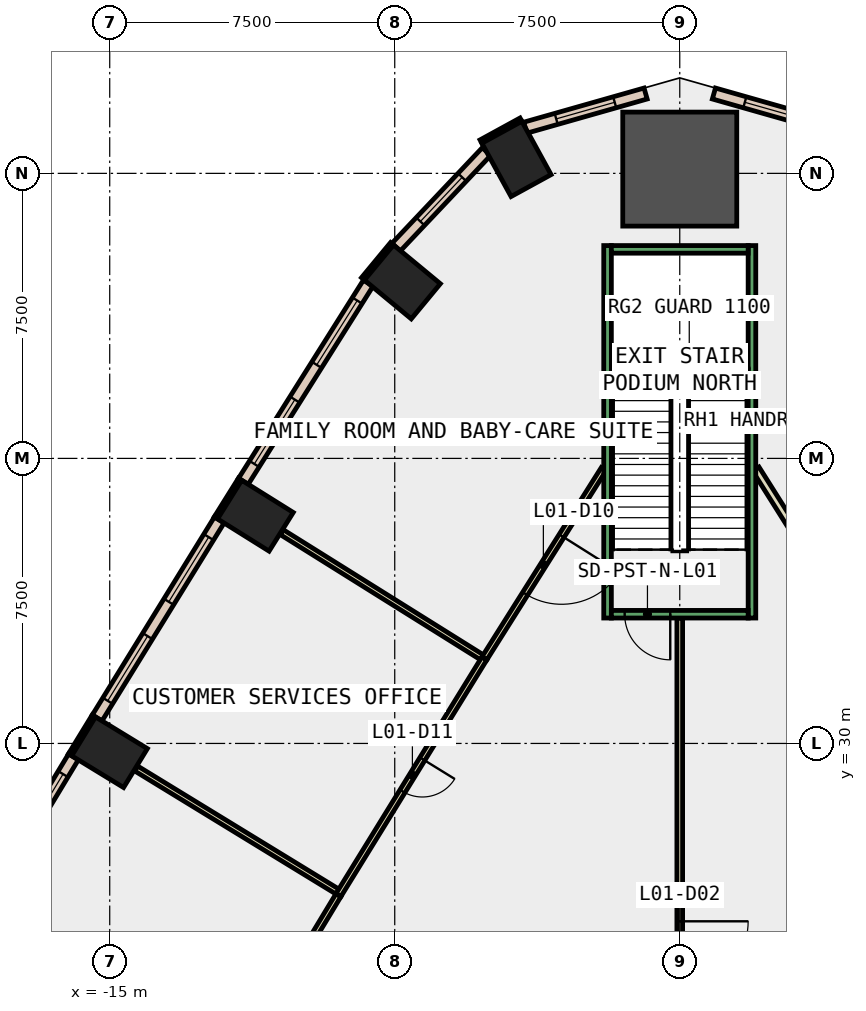
"""IFC4 building model, lengths in metres.
Left out: names, types, materials, properties, quantities, classifications, styles, units other than length and angle.
Written with IfcOpenShell. Run it as: python <this file> out.ifc"""

import sys

from ifc_helpers import new_model, si_unit, direction, frame, frame_2d, origin, origin_2d, place, context, subcontext, project, spatial, rectangle, extrude, element, fill, save


model = new_model("IFC4")
c1 = context("Model", 3, precision=1e-05, world=origin(), true_north=direction((0.0, 1.0)))
c2 = subcontext(c1, "Body", "Model", "MODEL_VIEW")
j1 = project(units=[si_unit("LENGTHUNIT", "METRE"), si_unit("PLANEANGLEUNIT", "RADIAN")], contexts=[c1])
p1 = place(None, origin())
s1 = spatial("IfcSite", under=j1, at=p1, CompositionType="ELEMENT")
p2 = place(p1, origin())
s2 = spatial("IfcBuilding", under=s1, at=p2, CompositionType="ELEMENT")
p3 = place(p2, frame((0.0, 0.0, 9.0)))
s3 = spatial("IfcBuildingStorey", under=s2, at=p3, CompositionType="ELEMENT", Elevation=9.0)
p4 = place(p3, frame((0.0, 45.112, -0.45), z_axis=(0.0, 0.0, 1.0), x_axis=(0.0, 1.0, 0.0)))
e1 = element("IfcColumn", 1, at=p4, inside=s3, PredefinedType="COLUMN", context=c2, shape_type="SweptSolid", body=[
    extrude(rectangle(XDim=3.0, YDim=3.0, at=origin_2d()), origin(), (0.0, 0.0, 1.0), 6.0),
])
for number, where, z_axis, x_axis in (
    (2, (-4.297, 45.38, -0.45), (0.0, 0.0, 1.0), (0.877, 0.48, 0.0)),
    (3, (-7.299, 42.144, -0.45), (0.0, 0.0, 1.0), (0.638, 0.77, 0.0)),
    (4, (-11.167, 35.993, -0.45), (0.0, 0.0, 1.0), (0.53, 0.848, 0.0)),
    (5, (-15.005, 29.769, -0.45), (0.0, 0.0, 1.0), (0.522, 0.853, 0.0)),
):
    element("IfcColumn", number, at=place(p3, frame(where, z_axis=z_axis, x_axis=x_axis)), inside=s3, PredefinedType="COLUMN", context=c2, shape_type="SweptSolid", body=[
        extrude(rectangle(XDim=1.2, YDim=1.6, at=origin_2d()), origin(), (0.0, 0.0, 1.0), 6.0),
    ])
for number, where, z_axis, x_axis in (
    (6, (-4.179, 46.413, 0.0), (0.0, 0.0, 1.0), (-0.877, -0.48, 0.0)),
    (7, (-7.571, 43.148, 0.0), (0.0, 0.0, 1.0), (-0.638, -0.77, 0.0)),
    (8, (-11.57, 36.952, 0.0), (0.0, 0.0, 1.0), (-0.53, -0.848, 0.0)),
):
    element("IfcWall", number, at=place(p3, frame(where, z_axis=z_axis, x_axis=x_axis)), inside=s3, PredefinedType="STANDARD", context=c2, shape_type="SweptSolid", body=[
        extrude(rectangle(XDim=1.199, YDim=0.1, at=frame_2d((0.6, 0.0))), origin(), (0.0, 0.0, 1.0), 5.55),
    ])
p5 = place(p3, frame((-15.417, 30.724, 0.0), z_axis=(0.0, 0.0, 1.0), x_axis=(-0.521507599072, -0.853246637327, 0.0)))
e9 = element("IfcWall", 9, at=p5, inside=s3, PredefinedType="STANDARD", context=c2, shape_type="SweptSolid", body=[
    extrude(rectangle(XDim=1.2, YDim=0.1, at=frame_2d((0.6, 0.0))), origin(), (0.0, 0.0, 1.0), 5.55),
])
p6 = place(p3, frame((4.064, 46.202, 0.0), z_axis=(0.0, 0.0, 1.0), x_axis=(-0.961934470867, 0.273280211062, 0.0)))
e10 = element("IfcWall", 10, at=p6, inside=s3, PredefinedType="STANDARD", context=c2, shape_type="SweptSolid", body=[
    extrude(rectangle(XDim=3.29, YDim=0.3, at=frame_2d((1.645, 0.0))), origin(), (0.0, 0.0, 1.0), 5.55),
])
p7 = place(p6, frame((0.845, 0.0, 1.0)))
e11 = element("IfcOpeningElement", 11, at=p7, cuts=e10, PredefinedType="OPENING", context=c2, shape_type="SweptSolid", body=[
    extrude(rectangle(XDim=1.6, YDim=4.0, at=frame_2d((0.8, 2.0))), frame((0.0, 0.16, 0.0), z_axis=(0.0, -1.0, 0.0), x_axis=(1.0, 0.0, 0.0)), (0.0, 0.0, 1.0), 0.32),
])
p8 = place(p3, frame((-0.899, 47.101, 0.0), z_axis=(0.0, 0.0, 1.0), x_axis=(-0.961934470867, -0.273280211062, 0.0)))
e12 = element("IfcWall", 12, at=p8, inside=s3, PredefinedType="STANDARD", context=c2, shape_type="SweptSolid", body=[
    extrude(rectangle(XDim=3.29, YDim=0.3, at=frame_2d((1.645, 0.0))), origin(), (0.0, 0.0, 1.0), 5.55),
])
p9 = place(p8, frame((0.845, 0.0, 1.0)))
e13 = element("IfcOpeningElement", 13, at=p9, cuts=e12, PredefinedType="OPENING", context=c2, shape_type="SweptSolid", body=[
    extrude(rectangle(XDim=1.6, YDim=4.0, at=frame_2d((0.8, 2.0))), frame((0.0, 0.16, 0.0), z_axis=(0.0, -1.0, 0.0), x_axis=(1.0, 0.0, 0.0)), (0.0, 0.0, 1.0), 0.32),
])
p10 = place(p3, frame((-5.086, 45.573, 0.0), z_axis=(0.0, 0.0, 1.0), x_axis=(-0.687081126245, -0.726580708495, 0.0)))
e14 = element("IfcWall", 14, at=p10, inside=s3, PredefinedType="STANDARD", context=c2, shape_type="SweptSolid", body=[
    extrude(rectangle(XDim=3.461, YDim=0.3, at=frame_2d((1.73, 0.0))), origin(), (0.0, 0.0, 1.0), 5.55),
])
p11 = place(p10, frame((0.931, 0.0, 1.0)))
e15 = element("IfcOpeningElement", 15, at=p11, cuts=e14, PredefinedType="OPENING", context=c2, shape_type="SweptSolid", body=[
    extrude(rectangle(XDim=1.6, YDim=4.0, at=frame_2d((0.8, 2.0))), frame((0.0, 0.16, 0.0), z_axis=(0.0, -1.0, 0.0), x_axis=(1.0, 0.0, 0.0)), (0.0, 0.0, 1.0), 0.32),
])
p12 = place(p3, frame((-8.198, 42.111, 0.0), z_axis=(0.0, 0.0, 1.0), x_axis=(-0.53304020879, -0.846089910006, 0.0)))
e16 = element("IfcWall", 16, at=p12, inside=s3, PredefinedType="STANDARD", context=c2, shape_type="SweptSolid", body=[
    extrude(rectangle(XDim=6.163, YDim=0.3, at=frame_2d((3.081, 0.0))), origin(), (0.0, 0.0, 1.0), 5.55),
])
p13 = place(p12, frame((0.541, 0.0, 1.0)))
e17 = element("IfcOpeningElement", 17, at=p13, cuts=e16, PredefinedType="OPENING", context=c2, shape_type="SweptSolid", body=[
    extrude(rectangle(XDim=2.0, YDim=4.0, at=frame_2d((1.0, 2.0))), frame((0.0, 0.16, 0.0), z_axis=(0.0, -1.0, 0.0), x_axis=(1.0, 0.0, 0.0)), (0.0, 0.0, 1.0), 0.32),
])
p14 = place(p12, frame((3.622, 0.0, 1.0)))
e18 = element("IfcOpeningElement", 18, at=p14, cuts=e16, PredefinedType="OPENING", context=c2, shape_type="SweptSolid", body=[
    extrude(rectangle(XDim=2.0, YDim=4.0, at=frame_2d((1.0, 2.0))), frame((0.0, 0.16, 0.0), z_axis=(0.0, -1.0, 0.0), x_axis=(1.0, 0.0, 0.0)), (0.0, 0.0, 1.0), 0.32),
])
p15 = place(p3, frame((-12.117, 35.881, 0.0), z_axis=(0.0, 0.0, 1.0), x_axis=(-0.524953701886, -0.85113078365, 0.0)))
e19 = element("IfcWall", 19, at=p15, inside=s3, PredefinedType="STANDARD", context=c2, shape_type="SweptSolid", body=[
    extrude(rectangle(XDim=6.123, YDim=0.3, at=frame_2d((3.061, 0.0))), origin(), (0.0, 0.0, 1.0), 5.55),
])
p16 = place(p15, frame((0.531, 0.0, 1.0)))
e20 = element("IfcOpeningElement", 20, at=p16, cuts=e19, PredefinedType="OPENING", context=c2, shape_type="SweptSolid", body=[
    extrude(rectangle(XDim=2.0, YDim=4.0, at=frame_2d((1.0, 2.0))), frame((0.0, 0.16, 0.0), z_axis=(0.0, -1.0, 0.0), x_axis=(1.0, 0.0, 0.0)), (0.0, 0.0, 1.0), 0.32),
])
p17 = place(p15, frame((3.592, 0.0, 1.0)))
e21 = element("IfcOpeningElement", 21, at=p17, cuts=e19, PredefinedType="OPENING", context=c2, shape_type="SweptSolid", body=[
    extrude(rectangle(XDim=2.0, YDim=4.0, at=frame_2d((1.0, 2.0))), frame((0.0, 0.16, 0.0), z_axis=(0.0, -1.0, 0.0), x_axis=(1.0, 0.0, 0.0)), (0.0, 0.0, 1.0), 0.32),
])
p18 = place(p3, frame((-15.954, 29.647, 0.0), z_axis=(0.0, 0.0, 1.0), x_axis=(-0.516687651362, -0.85617397235, 0.0)))
e22 = element("IfcWall", 22, at=p18, inside=s3, PredefinedType="STANDARD", context=c2, shape_type="SweptSolid", body=[
    extrude(rectangle(XDim=6.121, YDim=0.3, at=frame_2d((3.061, 0.0))), origin(), (0.0, 0.0, 1.0), 5.55),
])
p19 = place(p18, frame((0.53, 0.0, 1.0)))
e23 = element("IfcOpeningElement", 23, at=p19, cuts=e22, PredefinedType="OPENING", context=c2, shape_type="SweptSolid", body=[
    extrude(rectangle(XDim=2.0, YDim=4.0, at=frame_2d((1.0, 2.0))), frame((0.0, 0.16, 0.0), z_axis=(0.0, -1.0, 0.0), x_axis=(1.0, 0.0, 0.0)), (0.0, 0.0, 1.0), 0.32),
])
p20 = place(p18, frame((3.591, 0.0, 1.0)))
e24 = element("IfcOpeningElement", 24, at=p20, cuts=e22, PredefinedType="OPENING", context=c2, shape_type="SweptSolid", body=[
    extrude(rectangle(XDim=2.0, YDim=4.0, at=frame_2d((1.0, 2.0))), frame((0.0, 0.16, 0.0), z_axis=(0.0, -1.0, 0.0), x_axis=(1.0, 0.0, 0.0)), (0.0, 0.0, 1.0), 0.32),
])
p21 = place(p3, frame((5.141, 32.238, 0.0), z_axis=(0.0, 0.0, 1.0), x_axis=(-0.533266105174, 0.8459475522, 0.0)))
e25 = element("IfcWall", 25, at=p21, inside=s3, PredefinedType="PARTITIONING", context=c2, shape_type="SweptSolid", body=[
    extrude(rectangle(XDim=5.89, YDim=0.2, at=frame_2d((2.945, 0.0))), origin(), (0.0, 0.0, 1.0), 5.55),
])
p22 = place(p3, frame((-5.146, 32.229, 0.0), z_axis=(0.0, 0.0, 1.0), x_axis=(-0.847900028258, 0.530156148771, 0.0)))
e26 = element("IfcWall", 26, at=p22, inside=s3, PredefinedType="PARTITIONING", context=c2, shape_type="SweptSolid", body=[
    extrude(rectangle(XDim=6.281, YDim=0.15, at=frame_2d((3.141, 0.0))), origin(), (0.0, 0.0, 1.0), 5.55),
])
p23 = place(p3, frame((-2.0, 37.221, 0.0), z_axis=(0.0, 0.0, 1.0), x_axis=(-0.533266105174, -0.8459475522, 0.0)))
e27 = element("IfcWall", 27, at=p23, inside=s3, PredefinedType="PARTITIONING", context=c2, shape_type="SweptSolid", body=[
    extrude(rectangle(XDim=5.89, YDim=0.15, at=frame_2d((2.945, 0.0))), origin(), (0.0, 0.0, 1.0), 5.55),
])
p24 = place(p23, frame((2.08, 0.0, 0.0)))
e28 = element("IfcOpeningElement", 28, at=p24, cuts=e27, PredefinedType="OPENING", context=c2, shape_type="SweptSolid", body=[
    extrude(rectangle(XDim=1.8, YDim=2.1, at=frame_2d((0.9, 1.05))), frame((0.0, 0.085, 0.0), z_axis=(0.0, -1.0, 0.0), x_axis=(1.0, 0.0, 0.0)), (0.0, 0.0, 1.0), 0.17),
])
p25 = place(p3, frame((-8.947, 26.065, 0.0), z_axis=(0.0, 0.0, 1.0), x_axis=(-0.853151116909, 0.521663849348, 0.0)))
e29 = element("IfcWall", 29, at=p25, inside=s3, PredefinedType="PARTITIONING", context=c2, shape_type="SweptSolid", body=[
    extrude(rectangle(XDim=6.28, YDim=0.15, at=frame_2d((3.14, 0.0))), origin(), (0.0, 0.0, 1.0), 5.55),
])
p26 = place(p3, frame((-5.141, 32.238, 0.0), z_axis=(0.0, 0.0, 1.0), x_axis=(-0.52478961199, -0.851231967884, 0.0)))
e30 = element("IfcWall", 30, at=p26, inside=s3, PredefinedType="PARTITIONING", context=c2, shape_type="SweptSolid", body=[
    extrude(rectangle(XDim=7.319, YDim=0.15, at=frame_2d((3.659, 0.0))), origin(), (0.0, 0.0, 1.0), 5.55),
])
p27 = place(p26, frame((3.11, 0.0, 0.0)))
e31 = element("IfcOpeningElement", 31, at=p27, cuts=e30, PredefinedType="OPENING", context=c2, shape_type="SweptSolid", body=[
    extrude(rectangle(XDim=1.0, YDim=2.1, at=frame_2d((0.5, 1.05))), frame((0.0, 0.085, 0.0), z_axis=(0.0, -1.0, 0.0), x_axis=(1.0, 0.0, 0.0)), (0.0, 0.0, 1.0), 0.17),
])
p28 = place(p3, frame((-8.981, 26.008, 0.0), z_axis=(0.0, 0.0, 1.0), x_axis=(-0.516682614934, -0.856177011736, 0.0)))
e32 = element("IfcWall", 32, at=p28, inside=s3, PredefinedType="PARTITIONING", context=c2, shape_type="SweptSolid", body=[
    extrude(rectangle(XDim=7.169, YDim=0.15, at=frame_2d((3.584, 0.0))), origin(), (0.0, 0.0, 1.0), 5.55),
])
p29 = place(p3, frame((0.0, 33.3, 0.0), z_axis=(0.0, 0.0, 1.0), x_axis=(0.0, -1.0, 0.0)))
e33 = element("IfcWall", 33, at=p29, inside=s3, PredefinedType="PARTITIONING", context=c2, shape_type="SweptSolid", body=[
    extrude(rectangle(XDim=9.8, YDim=0.15, at=frame_2d((4.9, 0.0))), origin(), (0.0, 0.0, 1.0), 5.55),
])
p30 = place(p29, frame((7.98, 0.0, 0.0)))
e34 = element("IfcOpeningElement", 34, at=p30, cuts=e33, PredefinedType="OPENING", context=c2, shape_type="SweptSolid", body=[
    extrude(rectangle(XDim=1.8, YDim=2.1, at=frame_2d((0.9, 1.05))), frame((0.0, 0.085, 0.0), z_axis=(0.0, -1.0, 0.0), x_axis=(1.0, 0.0, 0.0)), (0.0, 0.0, 1.0), 0.17),
])
for number, where, z_axis, x_axis in (
    (35, (1.9, 33.3, 0.0), (0.0, 0.0, 1.0), (0.0, 1.0, 0.0)),
    (36, (-1.9, 33.3, 0.0), (0.0, 0.0, 1.0), (0.0, 1.0, 0.0)),
):
    element("IfcWall", number, at=place(p3, frame(where, z_axis=z_axis, x_axis=x_axis)), inside=s3, PredefinedType="STANDARD", context=c2, shape_type="SweptSolid", body=[
        extrude(rectangle(XDim=9.8, YDim=0.2, at=frame_2d((4.9, 0.0))), origin(), (0.0, 0.0, 1.0), 5.55),
    ])
p31 = place(p3, frame((1.8, 33.4, 0.0), z_axis=(0.0, 0.0, 1.0), x_axis=(-1.0, 0.0, 0.0)))
e37 = element("IfcWall", 37, at=p31, inside=s3, PredefinedType="STANDARD", context=c2, shape_type="SweptSolid", body=[
    extrude(rectangle(XDim=3.6, YDim=0.2, at=frame_2d((1.8, 0.0))), origin(), (0.0, 0.0, 1.0), 5.55),
])
p32 = place(p31, frame((2.05, 0.0, 0.0)))
e38 = element("IfcOpeningElement", 38, at=p32, cuts=e37, PredefinedType="OPENING", context=c2, shape_type="SweptSolid", body=[
    extrude(rectangle(XDim=1.2, YDim=2.2, at=frame_2d((0.6, 1.1))), frame((0.0, 0.11, 0.0), z_axis=(0.0, -1.0, 0.0), x_axis=(1.0, 0.0, 0.0)), (0.0, 0.0, 1.0), 0.22),
])
p33 = place(p3, frame((1.8, 43.0, 0.0), z_axis=(0.0, 0.0, 1.0), x_axis=(-1.0, 0.0, 0.0)))
e39 = element("IfcWall", 39, at=p33, inside=s3, PredefinedType="STANDARD", context=c2, shape_type="SweptSolid", body=[
    extrude(rectangle(XDim=3.6, YDim=0.2, at=frame_2d((1.8, 0.0))), origin(), (0.0, 0.0, 1.0), 5.55),
])
p34 = place(p7, origin())
e40 = element("IfcWindow", 40, at=p34, inside=s3, PartitioningType="SINGLE_PANEL", PredefinedType="WINDOW", context=c2, shape_type="SweptSolid", body=[
    extrude(rectangle(XDim=1.6, YDim=4.0, at=frame_2d((0.8, 2.0))), frame((0.0, 0.03, 0.0), z_axis=(0.0, -1.0, 0.0), x_axis=(1.0, 0.0, 0.0)), (0.0, 0.0, 1.0), 0.06),
])
fill(e11, e40)
p35 = place(p9, origin())
e41 = element("IfcWindow", 41, at=p35, inside=s3, PartitioningType="SINGLE_PANEL", PredefinedType="WINDOW", context=c2, shape_type="SweptSolid", body=[
    extrude(rectangle(XDim=1.6, YDim=4.0, at=frame_2d((0.8, 2.0))), frame((0.0, 0.03, 0.0), z_axis=(0.0, -1.0, 0.0), x_axis=(1.0, 0.0, 0.0)), (0.0, 0.0, 1.0), 0.06),
])
fill(e13, e41)
p36 = place(p11, origin())
e42 = element("IfcWindow", 42, at=p36, inside=s3, PartitioningType="SINGLE_PANEL", PredefinedType="WINDOW", context=c2, shape_type="SweptSolid", body=[
    extrude(rectangle(XDim=1.6, YDim=4.0, at=frame_2d((0.8, 2.0))), frame((0.0, 0.03, 0.0), z_axis=(0.0, -1.0, 0.0), x_axis=(1.0, 0.0, 0.0)), (0.0, 0.0, 1.0), 0.06),
])
fill(e15, e42)
p37 = place(p13, origin())
e43 = element("IfcWindow", 43, at=p37, inside=s3, PartitioningType="SINGLE_PANEL", PredefinedType="WINDOW", context=c2, shape_type="SweptSolid", body=[
    extrude(rectangle(XDim=2.0, YDim=4.0, at=frame_2d((1.0, 2.0))), frame((0.0, 0.03, 0.0), z_axis=(0.0, -1.0, 0.0), x_axis=(1.0, 0.0, 0.0)), (0.0, 0.0, 1.0), 0.06),
])
fill(e17, e43)
p38 = place(p14, origin())
e44 = element("IfcWindow", 44, at=p38, inside=s3, PartitioningType="SINGLE_PANEL", PredefinedType="WINDOW", context=c2, shape_type="SweptSolid", body=[
    extrude(rectangle(XDim=2.0, YDim=4.0, at=frame_2d((1.0, 2.0))), frame((0.0, 0.03, 0.0), z_axis=(0.0, -1.0, 0.0), x_axis=(1.0, 0.0, 0.0)), (0.0, 0.0, 1.0), 0.06),
])
fill(e18, e44)
p39 = place(p16, origin())
e45 = element("IfcWindow", 45, at=p39, inside=s3, PartitioningType="SINGLE_PANEL", PredefinedType="WINDOW", context=c2, shape_type="SweptSolid", body=[
    extrude(rectangle(XDim=2.0, YDim=4.0, at=frame_2d((1.0, 2.0))), frame((0.0, 0.03, 0.0), z_axis=(0.0, -1.0, 0.0), x_axis=(1.0, 0.0, 0.0)), (0.0, 0.0, 1.0), 0.06),
])
fill(e20, e45)
p40 = place(p17, origin())
e46 = element("IfcWindow", 46, at=p40, inside=s3, PartitioningType="SINGLE_PANEL", PredefinedType="WINDOW", context=c2, shape_type="SweptSolid", body=[
    extrude(rectangle(XDim=2.0, YDim=4.0, at=frame_2d((1.0, 2.0))), frame((0.0, 0.03, 0.0), z_axis=(0.0, -1.0, 0.0), x_axis=(1.0, 0.0, 0.0)), (0.0, 0.0, 1.0), 0.06),
])
fill(e21, e46)
p41 = place(p19, origin())
e47 = element("IfcWindow", 47, at=p41, inside=s3, PartitioningType="SINGLE_PANEL", PredefinedType="WINDOW", context=c2, shape_type="SweptSolid", body=[
    extrude(rectangle(XDim=2.0, YDim=4.0, at=frame_2d((1.0, 2.0))), frame((0.0, 0.03, 0.0), z_axis=(0.0, -1.0, 0.0), x_axis=(1.0, 0.0, 0.0)), (0.0, 0.0, 1.0), 0.06),
])
fill(e23, e47)
p42 = place(p30, origin())
e48 = element("IfcDoor", 48, at=p42, inside=s3, OperationType="DOUBLE_DOOR_SINGLE_SWING", PredefinedType="DOOR", context=c2, shape_type="SweptSolid", body=[
    extrude(rectangle(XDim=1.8, YDim=2.1, at=frame_2d((0.9, 1.05))), frame((0.0, 0.025, 0.0), z_axis=(0.0, -1.0, 0.0), x_axis=(1.0, 0.0, 0.0)), (0.0, 0.0, 1.0), 0.05),
])
fill(e34, e48)
p43 = place(p24, origin())
e49 = element("IfcDoor", 49, at=p43, inside=s3, OperationType="DOUBLE_DOOR_SINGLE_SWING", PredefinedType="DOOR", context=c2, shape_type="SweptSolid", body=[
    extrude(rectangle(XDim=1.8, YDim=2.1, at=frame_2d((0.9, 1.05))), frame((0.0, 0.025, 0.0), z_axis=(0.0, -1.0, 0.0), x_axis=(1.0, 0.0, 0.0)), (0.0, 0.0, 1.0), 0.05),
])
fill(e28, e49)
p44 = place(p27, origin())
e50 = element("IfcDoor", 50, at=p44, inside=s3, OperationType="SINGLE_SWING_RIGHT", PredefinedType="DOOR", context=c2, shape_type="SweptSolid", body=[
    extrude(rectangle(XDim=1.0, YDim=2.1, at=frame_2d((0.5, 1.05))), frame((0.0, 0.025, 0.0), z_axis=(0.0, -1.0, 0.0), x_axis=(1.0, 0.0, 0.0)), (0.0, 0.0, 1.0), 0.05),
])
fill(e31, e50)
p45 = place(p32, origin())
e51 = element("IfcDoor", 51, at=p45, inside=s3, OperationType="SINGLE_SWING_LEFT", PredefinedType="DOOR", context=c2, shape_type="SweptSolid", body=[
    extrude(rectangle(XDim=1.2, YDim=2.2, at=frame_2d((0.6, 1.1))), frame((0.0, 0.025, 0.0), z_axis=(0.0, -1.0, 0.0), x_axis=(1.0, 0.0, 0.0)), (0.0, 0.0, 1.0), 0.05),
])
fill(e38, e51)
save(model, sys.argv[1])
